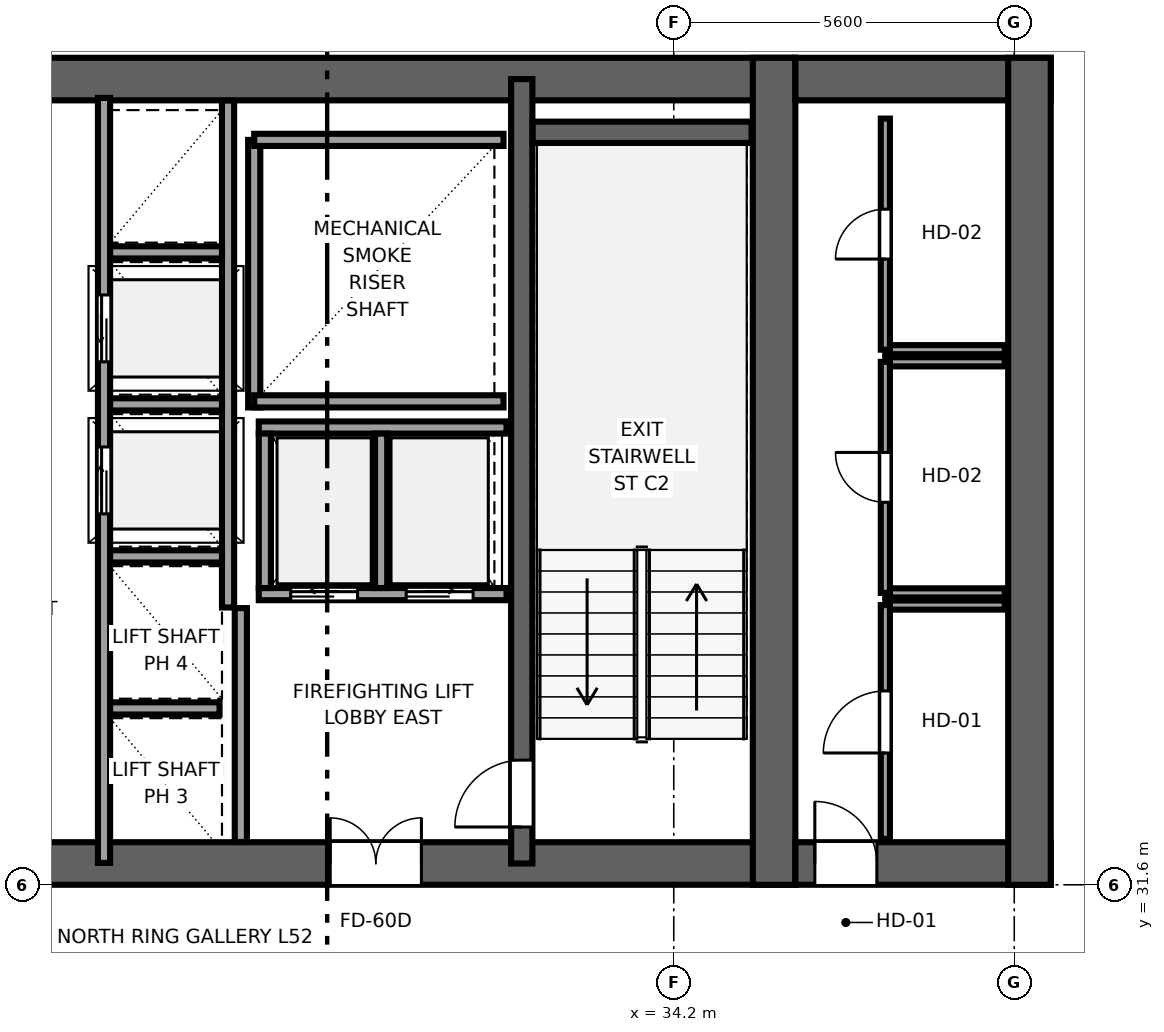
"""IFC4 building model, lengths in metres.
Left out: names, types, materials, properties, quantities, classifications, styles, units other than length and angle.
Written with IfcOpenShell. Run it as: python <this file> out.ifc"""

import sys

from ifc_helpers import new_model, si_unit, direction, frame, frame_2d, origin, place, context, subcontext, project, spatial, rectangle, extrude, source, transform, mapped, element, fill, save


model = new_model("IFC4")
c1 = context("Model", 3, precision=1e-05, world=origin(), true_north=direction((0.0, 1.0)))
c2 = subcontext(c1, "Body", "Model", "MODEL_VIEW")
j1 = project(units=[si_unit("LENGTHUNIT", "METRE"), si_unit("PLANEANGLEUNIT", "RADIAN")], contexts=[c1])
p1 = place(None, origin())
s1 = spatial("IfcSite", under=j1, at=p1, CompositionType="ELEMENT")
p2 = place(p1, origin())
s2 = spatial("IfcBuilding", under=s1, at=p2, CompositionType="ELEMENT")
p3 = place(p2, frame((0.0, 0.0, 198.2)))
s3 = spatial("IfcBuildingStorey", under=s2, at=p3, CompositionType="ELEMENT", Elevation=198.2)
p4 = place(p3, frame((9.8, 31.95, 0.0), z_axis=(0.0, 0.0, 1.0), x_axis=(1.0, 0.0, 0.0)))
e1 = element("IfcWall", 1, at=p4, inside=s3, PredefinedType="SHEAR", context=c2, shape_type="SweptSolid", body=[
    extrude(rectangle(XDim=26.4, YDim=0.7, at=frame_2d((13.2, 0.0))), origin(), (0.0, 0.0, 1.0), 3.55),
])
p5 = place(p4, frame((6.32, 0.0, 0.0), z_axis=(0.0, 0.0, 1.0), x_axis=(-1.0, 0.0, 0.0)))
e2 = element("IfcOpeningElement", 2, at=p5, cuts=e1, PredefinedType="OPENING", context=c2, shape_type="SweptSolid", body=[
    extrude(rectangle(XDim=1.5, YDim=2.04, at=frame_2d((0.75, 1.02))), frame((0.0, 0.36, 0.0), z_axis=(0.0, -1.0, 0.0), x_axis=(1.0, 0.0, 0.0)), (0.0, 0.0, 1.0), 0.72),
])
p6 = place(p4, frame((13.95, 0.0, 0.0), z_axis=(0.0, 0.0, 1.0), x_axis=(-1.0, 0.0, 0.0)))
e3 = element("IfcOpeningElement", 3, at=p6, cuts=e1, PredefinedType="OPENING", context=c2, shape_type="SweptSolid", body=[
    extrude(rectangle(XDim=1.5, YDim=2.04, at=frame_2d((0.75, 1.02))), frame((0.0, 0.36, 0.0), z_axis=(0.0, -1.0, 0.0), x_axis=(1.0, 0.0, 0.0)), (0.0, 0.0, 1.0), 0.72),
])
p7 = place(p4, frame((20.25, 0.0, 0.0), z_axis=(0.0, 0.0, 1.0), x_axis=(-1.0, 0.0, 0.0)))
e4 = element("IfcOpeningElement", 4, at=p7, cuts=e1, PredefinedType="OPENING", context=c2, shape_type="SweptSolid", body=[
    extrude(rectangle(XDim=1.5, YDim=2.04, at=frame_2d((0.75, 1.02))), frame((0.0, 0.36, 0.0), z_axis=(0.0, -1.0, 0.0), x_axis=(1.0, 0.0, 0.0)), (0.0, 0.0, 1.0), 0.72),
])
p8 = place(p4, frame((8.37, 0.0, 0.0), z_axis=(0.0, 0.0, 1.0), x_axis=(-1.0, 0.0, 0.0)))
e5 = element("IfcOpeningElement", 5, at=p8, cuts=e1, PredefinedType="OPENING", context=c2, shape_type="SweptSolid", body=[
    extrude(rectangle(XDim=0.82, YDim=2.01, at=frame_2d((0.41, 1.005))), frame((0.0, 0.36, 0.0), z_axis=(0.0, -1.0, 0.0), x_axis=(1.0, 0.0, 0.0)), (0.0, 0.0, 1.0), 0.72),
])
p9 = place(p3, frame((9.8, 44.85, 0.0), z_axis=(0.0, 0.0, 1.0), x_axis=(1.0, 0.0, 0.0)))
e6 = element("IfcWall", 6, at=p9, inside=s3, PredefinedType="SHEAR", context=c2, shape_type="SweptSolid", body=[
    extrude(rectangle(XDim=26.4, YDim=0.7, at=frame_2d((13.2, 0.0))), origin(), (0.0, 0.0, 1.0), 3.55),
])
p10 = place(p3, frame((35.85, 31.6, 0.0), z_axis=(0.0, 0.0, 1.0), x_axis=(0.0, 1.0, 0.0)))
e7 = element("IfcWall", 7, at=p10, inside=s3, PredefinedType="SHEAR", context=c2, shape_type="SweptSolid", body=[
    extrude(rectangle(XDim=13.6, YDim=0.7, at=frame_2d((6.8, 0.0))), origin(), (0.0, 0.0, 1.0), 3.55),
])
p11 = place(p3, frame((31.7, 31.95, 0.0), z_axis=(0.0, 0.0, 1.0), x_axis=(0.0, 1.0, 0.0)))
e8 = element("IfcWall", 8, at=p11, inside=s3, PredefinedType="SHEAR", context=c2, shape_type="SweptSolid", body=[
    extrude(rectangle(XDim=12.9, YDim=0.35, at=frame_2d((6.45, 0.0))), origin(), (0.0, 0.0, 1.0), 3.55),
])
p12 = place(p11, frame((1.7, 0.0, 0.0), z_axis=(0.0, 0.0, 1.0), x_axis=(-1.0, 0.0, 0.0)))
e9 = element("IfcOpeningElement", 9, at=p12, cuts=e8, PredefinedType="OPENING", context=c2, shape_type="SweptSolid", body=[
    extrude(rectangle(XDim=1.1, YDim=2.12, at=frame_2d((0.55, 1.06))), frame((0.0, 0.185, 0.0), z_axis=(0.0, -1.0, 0.0), x_axis=(1.0, 0.0, 0.0)), (0.0, 0.0, 1.0), 0.37),
])
p13 = place(p3, frame((36.2, 31.95, 0.0), z_axis=(0.0, 0.0, 1.0), x_axis=(1.0, 0.0, 0.0)))
e10 = element("IfcWall", 10, at=p13, inside=s3, PredefinedType="SHEAR", context=c2, shape_type="SweptSolid", body=[
    extrude(rectangle(XDim=4.2, YDim=0.7, at=frame_2d((2.1, 0.0))), origin(), (0.0, 0.0, 1.0), 3.55),
])
p14 = place(p13, frame((1.34, 0.0, 0.0), z_axis=(0.0, 0.0, 1.0), x_axis=(-1.0, 0.0, 0.0)))
e11 = element("IfcOpeningElement", 11, at=p14, cuts=e10, PredefinedType="OPENING", context=c2, shape_type="SweptSolid", body=[
    extrude(rectangle(XDim=1.02, YDim=2.03, at=frame_2d((0.51, 1.015))), frame((0.0, 0.36, 0.0), z_axis=(0.0, -1.0, 0.0), x_axis=(1.0, 0.0, 0.0)), (0.0, 0.0, 1.0), 0.72),
])
p15 = place(p3, frame((36.2, 44.85, 0.0), z_axis=(0.0, 0.0, 1.0), x_axis=(1.0, 0.0, 0.0)))
e12 = element("IfcWall", 12, at=p15, inside=s3, PredefinedType="SHEAR", context=c2, shape_type="SweptSolid", body=[
    extrude(rectangle(XDim=4.2, YDim=0.7, at=frame_2d((2.1, 0.0))), origin(), (0.0, 0.0, 1.0), 3.55),
])
p16 = place(p3, frame((40.05, 31.6, 0.0), z_axis=(0.0, 0.0, 1.0), x_axis=(0.0, 1.0, 0.0)))
e13 = element("IfcWall", 13, at=p16, inside=s3, PredefinedType="SHEAR", context=c2, shape_type="SweptSolid", body=[
    extrude(rectangle(XDim=13.6, YDim=0.7, at=frame_2d((6.8, 0.0))), origin(), (0.0, 0.0, 1.0), 3.55),
])
p17 = place(p3, frame((31.88, 43.975, 0.0), z_axis=(0.0, 0.0, 1.0), x_axis=(1.0, 0.0, 0.0)))
e14 = element("IfcWall", 14, at=p17, inside=s3, PredefinedType="SHEAR", context=c2, shape_type="SweptSolid", body=[
    extrude(rectangle(XDim=3.6, YDim=0.35, at=frame_2d((1.8, 0.0))), origin(), (0.0, 0.0, 1.0), 3.55),
])
p18 = place(p3, frame((27.3, 39.45, 0.0), z_axis=(0.0, 0.0, 1.0), x_axis=(0.0, 1.0, 0.0)))
e15 = element("IfcWall", 15, at=p18, inside=s3, PredefinedType="SOLIDWALL", context=c2, shape_type="SweptSolid", body=[
    extrude(rectangle(XDim=4.4, YDim=0.2, at=frame_2d((2.2, 0.0))), origin(), (0.0, 0.0, 1.0), 3.37),
])
for number, where, z_axis, x_axis in (
    (16, (27.3, 39.55, 0.0), (0.0, 0.0, 1.0), (1.0, 0.0, 0.0)),
    (17, (27.3, 43.85, 0.0), (0.0, 0.0, 1.0), (1.0, 0.0, 0.0)),
):
    element("IfcWall", number, at=place(p3, frame(where, z_axis=z_axis, x_axis=x_axis)), inside=s3, PredefinedType="SOLIDWALL", context=c2, shape_type="SweptSolid", body=[
        extrude(rectangle(XDim=4.1, YDim=0.2, at=frame_2d((2.05, 0.0))), origin(), (0.0, 0.0, 1.0), 3.37),
    ])
p19 = place(p3, frame((27.08, 32.304, 0.0), z_axis=(0.0, 0.0, 1.0), x_axis=(0.0, 1.0, 0.0)))
e18 = element("IfcWall", 18, at=p19, inside=s3, PredefinedType="SOLIDWALL", context=c2, shape_type="SweptSolid", body=[
    extrude(rectangle(XDim=3.846, YDim=0.2, at=frame_2d((1.923, 0.0))), origin(), (0.0, 0.0, 1.0), 3.37),
])
p20 = place(p3, frame((27.375, 36.38, 0.0), z_axis=(0.0, 0.0, 1.0), x_axis=(1.0, 0.0, 0.0)))
e19 = element("IfcWall", 19, at=p20, inside=s3, PredefinedType="SOLIDWALL", context=c2, shape_type="SweptSolid", body=[
    extrude(rectangle(XDim=4.075, YDim=0.2, at=frame_2d((2.038, 0.0))), origin(), (0.0, 0.0, 1.0), 3.37),
])
p21 = place(p20, frame((0.525, 0.0, 0.0)))
e20 = element("IfcOpeningElement", 20, at=p21, cuts=e19, PredefinedType="OPENING", context=c2, shape_type="SweptSolid", body=[
    extrude(rectangle(XDim=1.1, YDim=2.12, at=frame_2d((0.55, 1.06))), frame((0.0, 0.11, 0.0), z_axis=(0.0, -1.0, 0.0), x_axis=(1.0, 0.0, 0.0)), (0.0, 0.0, 1.0), 0.22),
])
p22 = place(p20, frame((2.425, 0.0, 0.0)))
e21 = element("IfcOpeningElement", 21, at=p22, cuts=e19, PredefinedType="OPENING", context=c2, shape_type="SweptSolid", body=[
    extrude(rectangle(XDim=1.1, YDim=2.12, at=frame_2d((0.55, 1.06))), frame((0.0, 0.11, 0.0), z_axis=(0.0, -1.0, 0.0), x_axis=(1.0, 0.0, 0.0)), (0.0, 0.0, 1.0), 0.22),
])
p23 = place(p3, frame((27.375, 39.12, 0.0), z_axis=(0.0, 0.0, 1.0), x_axis=(1.0, 0.0, 0.0)))
e22 = element("IfcWall", 22, at=p23, inside=s3, PredefinedType="SOLIDWALL", context=c2, shape_type="SweptSolid", body=[
    extrude(rectangle(XDim=4.075, YDim=0.2, at=frame_2d((2.038, 0.0))), origin(), (0.0, 0.0, 1.0), 3.37),
])
for number, where, z_axis, x_axis in (
    (23, (27.475, 36.48, 0.0), (0.0, 0.0, 1.0), (0.0, 1.0, 0.0)),
    (24, (29.387, 36.48, 0.0), (0.0, 0.0, 1.0), (0.0, 1.0, 0.0)),
):
    element("IfcWall", number, at=place(p3, frame(where, z_axis=z_axis, x_axis=x_axis)), inside=s3, PredefinedType="SOLIDWALL", context=c2, shape_type="SweptSolid", body=[
        extrude(rectangle(XDim=2.54, YDim=0.2, at=frame_2d((1.27, 0.0))), origin(), (0.0, 0.0, 1.0), 3.37),
    ])
p24 = place(p3, frame((24.83, 31.96, 0.0), z_axis=(0.0, 0.0, 1.0), x_axis=(0.0, 1.0, 0.0)))
e25 = element("IfcWall", 25, at=p24, inside=s3, PredefinedType="SOLIDWALL", context=c2, shape_type="SweptSolid", body=[
    extrude(rectangle(XDim=12.58, YDim=0.2, at=frame_2d((6.29, 0.0))), origin(), (0.0, 0.0, 1.0), 3.37),
])
p25 = place(p24, frame((5.74, 0.0, 0.0)))
e26 = element("IfcOpeningElement", 26, at=p25, cuts=e25, PredefinedType="OPENING", context=c2, shape_type="SweptSolid", body=[
    extrude(rectangle(XDim=1.1, YDim=2.12, at=frame_2d((0.55, 1.06))), frame((0.0, 0.11, 0.0), z_axis=(0.0, -1.0, 0.0), x_axis=(1.0, 0.0, 0.0)), (0.0, 0.0, 1.0), 0.22),
])
p26 = place(p24, frame((8.24, 0.0, 0.0)))
e27 = element("IfcOpeningElement", 27, at=p26, cuts=e25, PredefinedType="OPENING", context=c2, shape_type="SweptSolid", body=[
    extrude(rectangle(XDim=1.1, YDim=2.12, at=frame_2d((0.55, 1.06))), frame((0.0, 0.11, 0.0), z_axis=(0.0, -1.0, 0.0), x_axis=(1.0, 0.0, 0.0)), (0.0, 0.0, 1.0), 0.22),
])
p27 = place(p3, frame((26.87, 36.16, 0.0), z_axis=(0.0, 0.0, 1.0), x_axis=(0.0, 1.0, 0.0)))
e28 = element("IfcWall", 28, at=p27, inside=s3, PredefinedType="SOLIDWALL", context=c2, shape_type="SweptSolid", body=[
    extrude(rectangle(XDim=8.336, YDim=0.2, at=frame_2d((4.168, 0.0))), origin(), (0.0, 0.0, 1.0), 3.37),
])
p28 = place(p3, frame((24.93, 34.5, 0.0), z_axis=(0.0, 0.0, 1.0), x_axis=(1.0, 0.0, 0.0)))
e29 = element("IfcWall", 29, at=p28, inside=s3, PredefinedType="SOLIDWALL", context=c2, shape_type="SweptSolid", body=[
    extrude(rectangle(XDim=1.8, YDim=0.2, at=frame_2d((0.9, 0.0))), origin(), (0.0, 0.0, 1.0), 3.37),
])
for number, where, z_axis, x_axis in (
    (30, (24.93, 37.0, 0.0), (0.0, 0.0, 1.0), (1.0, 0.0, 0.0)),
    (31, (24.93, 39.5, 0.0), (0.0, 0.0, 1.0), (1.0, 0.0, 0.0)),
    (32, (24.93, 42.0, 0.0), (0.0, 0.0, 1.0), (1.0, 0.0, 0.0)),
):
    element("IfcWall", number, at=place(p3, frame(where, z_axis=z_axis, x_axis=x_axis)), inside=s3, PredefinedType="SOLIDWALL", context=c2, shape_type="SweptSolid", body=[
        extrude(rectangle(XDim=1.84, YDim=0.2, at=frame_2d((0.92, 0.0))), origin(), (0.0, 0.0, 1.0), 3.37),
    ])
p29 = place(p3, frame((37.68, 36.2, 0.0), z_axis=(0.0, 0.0, 1.0), x_axis=(1.0, 0.0, 0.0)))
e33 = element("IfcWall", 33, at=p29, inside=s3, PredefinedType="PARTITIONING", context=c2, shape_type="SweptSolid", body=[
    extrude(rectangle(XDim=1.965, YDim=0.15, at=frame_2d((0.982, 0.0))), origin(), (0.0, 0.0, 1.0), 3.37),
])
p30 = place(p3, frame((37.68, 32.355, 0.0), z_axis=(0.0, 0.0, 1.0), x_axis=(0.0, 1.0, 0.0)))
e34 = element("IfcWall", 34, at=p30, inside=s3, PredefinedType="PARTITIONING", context=c2, shape_type="SweptSolid", body=[
    extrude(rectangle(XDim=3.845, YDim=0.15, at=frame_2d((1.922, 0.0))), origin(), (0.0, 0.0, 1.0), 3.37),
])
p31 = place(p30, frame((1.413, 0.0, 0.0)))
e35 = element("IfcOpeningElement", 35, at=p31, cuts=e34, PredefinedType="OPENING", context=c2, shape_type="SweptSolid", body=[
    extrude(rectangle(XDim=1.02, YDim=2.03, at=frame_2d((0.51, 1.015))), frame((0.0, 0.085, 0.0), z_axis=(0.0, -1.0, 0.0), x_axis=(1.0, 0.0, 0.0)), (0.0, 0.0, 1.0), 0.17),
])
for number, where, z_axis, x_axis in (
    (36, (37.68, 36.4, 0.0), (0.0, 0.0, 1.0), (1.0, 0.0, 0.0)),
    (37, (37.68, 40.2, 0.0), (0.0, 0.0, 1.0), (1.0, 0.0, 0.0)),
):
    element("IfcWall", number, at=place(p3, frame(where, z_axis=z_axis, x_axis=x_axis)), inside=s3, PredefinedType="PARTITIONING", context=c2, shape_type="SweptSolid", body=[
        extrude(rectangle(XDim=1.965, YDim=0.15, at=frame_2d((0.982, 0.0))), origin(), (0.0, 0.0, 1.0), 3.37),
    ])
p32 = place(p3, frame((37.68, 36.4, 0.0), z_axis=(0.0, 0.0, 1.0), x_axis=(0.0, 1.0, 0.0)))
e38 = element("IfcWall", 38, at=p32, inside=s3, PredefinedType="PARTITIONING", context=c2, shape_type="SweptSolid", body=[
    extrude(rectangle(XDim=3.8, YDim=0.15, at=frame_2d((1.9, 0.0))), origin(), (0.0, 0.0, 1.0), 3.37),
])
p33 = place(p32, frame((1.49, 0.0, 0.0)))
e39 = element("IfcOpeningElement", 39, at=p33, cuts=e38, PredefinedType="OPENING", context=c2, shape_type="SweptSolid", body=[
    extrude(rectangle(XDim=0.82, YDim=2.01, at=frame_2d((0.41, 1.005))), frame((0.0, 0.085, 0.0), z_axis=(0.0, -1.0, 0.0), x_axis=(1.0, 0.0, 0.0)), (0.0, 0.0, 1.0), 0.17),
])
p34 = place(p3, frame((37.68, 40.4, 0.0), z_axis=(0.0, 0.0, 1.0), x_axis=(1.0, 0.0, 0.0)))
e40 = element("IfcWall", 40, at=p34, inside=s3, PredefinedType="PARTITIONING", context=c2, shape_type="SweptSolid", body=[
    extrude(rectangle(XDim=1.965, YDim=0.15, at=frame_2d((0.982, 0.0))), origin(), (0.0, 0.0, 1.0), 3.37),
])
p35 = place(p3, frame((37.68, 40.4, 0.0), z_axis=(0.0, 0.0, 1.0), x_axis=(0.0, 1.0, 0.0)))
e41 = element("IfcWall", 41, at=p35, inside=s3, PredefinedType="PARTITIONING", context=c2, shape_type="SweptSolid", body=[
    extrude(rectangle(XDim=3.8, YDim=0.15, at=frame_2d((1.9, 0.0))), origin(), (0.0, 0.0, 1.0), 3.37),
])
p36 = place(p35, frame((1.49, 0.0, 0.0)))
e42 = element("IfcOpeningElement", 42, at=p36, cuts=e41, PredefinedType="OPENING", context=c2, shape_type="SweptSolid", body=[
    extrude(rectangle(XDim=0.82, YDim=2.01, at=frame_2d((0.41, 1.005))), frame((0.0, 0.085, 0.0), z_axis=(0.0, -1.0, 0.0), x_axis=(1.0, 0.0, 0.0)), (0.0, 0.0, 1.0), 0.17),
])
m1 = source(origin(), c2, "Body", "SweptSolid", [
    extrude(rectangle(XDim=1.1, YDim=2.12, at=frame_2d((0.55, 1.06))), frame((0.0, 0.025, 0.0), z_axis=(0.0, -1.0, 0.0), x_axis=(1.0, 0.0, 0.0)), (0.0, 0.0, 1.0), 0.05),
])
p37 = place(p12, origin())
e43 = element("IfcDoor", 43, at=p37, inside=s3, OperationType="SINGLE_SWING_LEFT", PredefinedType="DOOR", context=c2, shape_type="MappedRepresentation", body=[
    mapped(m1, transform((0.0, 0.0, 0.0), x_axis=(1.0, 0.0, 0.0), y_axis=(0.0, 1.0, 0.0), z_axis=(0.0, 0.0, 1.0), scale=1.0)),
])
fill(e9, e43)
m2 = source(origin(), c2, "Body", "SweptSolid", [
    extrude(rectangle(XDim=1.5, YDim=2.04, at=frame_2d((0.75, 1.02))), frame((0.0, 0.025, 0.0), z_axis=(0.0, -1.0, 0.0), x_axis=(1.0, 0.0, 0.0)), (0.0, 0.0, 1.0), 0.05),
])
p38 = place(p7, origin())
e44 = element("IfcDoor", 44, at=p38, inside=s3, OperationType="DOUBLE_DOOR_SINGLE_SWING", PredefinedType="DOOR", context=c2, shape_type="MappedRepresentation", body=[
    mapped(m2, transform((0.0, 0.0, 0.0), x_axis=(1.0, 0.0, 0.0), y_axis=(0.0, 1.0, 0.0), z_axis=(0.0, 0.0, 1.0), scale=1.0)),
])
fill(e4, e44)
m3 = source(origin(), c2, "Body", "SweptSolid", [
    extrude(rectangle(XDim=1.02, YDim=2.03, at=frame_2d((0.51, 1.015))), frame((0.0, 0.025, 0.0), z_axis=(0.0, -1.0, 0.0), x_axis=(1.0, 0.0, 0.0)), (0.0, 0.0, 1.0), 0.05),
])
p39 = place(p14, origin())
e45 = element("IfcDoor", 45, at=p39, inside=s3, OperationType="SINGLE_SWING_LEFT", PredefinedType="DOOR", context=c2, shape_type="MappedRepresentation", body=[
    mapped(m3, transform((0.0, 0.0, 0.0), x_axis=(1.0, 0.0, 0.0), y_axis=(0.0, 1.0, 0.0), z_axis=(0.0, 0.0, 1.0), scale=1.0)),
])
fill(e11, e45)
m4 = source(origin(), c2, "Body", "SweptSolid", [
    extrude(rectangle(XDim=1.1, YDim=2.12, at=frame_2d((0.55, 1.06))), frame((0.0, 0.025, 0.0), z_axis=(0.0, -1.0, 0.0), x_axis=(1.0, 0.0, 0.0)), (0.0, 0.0, 1.0), 0.05),
])
p40 = place(p21, origin())
e46 = element("IfcDoor", 46, at=p40, inside=s3, OperationType="SLIDING_TO_LEFT", PredefinedType="DOOR", context=c2, shape_type="MappedRepresentation", body=[
    mapped(m4, transform((0.0, 0.0, 0.0), x_axis=(1.0, 0.0, 0.0), y_axis=(0.0, 1.0, 0.0), z_axis=(0.0, 0.0, 1.0), scale=1.0)),
])
fill(e20, e46)
p41 = place(p22, origin())
e47 = element("IfcDoor", 47, at=p41, inside=s3, OperationType="SLIDING_TO_RIGHT", PredefinedType="DOOR", context=c2, shape_type="MappedRepresentation", body=[
    mapped(m4, transform((0.0, 0.0, 0.0), x_axis=(1.0, 0.0, 0.0), y_axis=(0.0, 1.0, 0.0), z_axis=(0.0, 0.0, 1.0), scale=1.0)),
])
fill(e21, e47)
p42 = place(p25, origin())
e48 = element("IfcDoor", 48, at=p42, inside=s3, OperationType="SLIDING_TO_RIGHT", PredefinedType="DOOR", context=c2, shape_type="MappedRepresentation", body=[
    mapped(m4, transform((0.0, 0.0, 0.0), x_axis=(1.0, 0.0, 0.0), y_axis=(0.0, 1.0, 0.0), z_axis=(0.0, 0.0, 1.0), scale=1.0)),
])
fill(e26, e48)
p43 = place(p26, origin())
e49 = element("IfcDoor", 49, at=p43, inside=s3, OperationType="SLIDING_TO_LEFT", PredefinedType="DOOR", context=c2, shape_type="MappedRepresentation", body=[
    mapped(m4, transform((0.0, 0.0, 0.0), x_axis=(1.0, 0.0, 0.0), y_axis=(0.0, 1.0, 0.0), z_axis=(0.0, 0.0, 1.0), scale=1.0)),
])
fill(e27, e49)
p44 = place(p31, origin())
e50 = element("IfcDoor", 50, at=p44, inside=s3, OperationType="SINGLE_SWING_LEFT", PredefinedType="DOOR", context=c2, shape_type="MappedRepresentation", body=[
    mapped(m3, transform((0.0, 0.0, 0.0), x_axis=(1.0, 0.0, 0.0), y_axis=(0.0, 1.0, 0.0), z_axis=(0.0, 0.0, 1.0), scale=1.0)),
])
fill(e35, e50)
m5 = source(origin(), c2, "Body", "SweptSolid", [
    extrude(rectangle(XDim=0.82, YDim=2.01, at=frame_2d((0.41, 1.005))), frame((0.0, 0.025, 0.0), z_axis=(0.0, -1.0, 0.0), x_axis=(1.0, 0.0, 0.0)), (0.0, 0.0, 1.0), 0.05),
])
p45 = place(p33, origin())
e51 = element("IfcDoor", 51, at=p45, inside=s3, OperationType="SINGLE_SWING_RIGHT", PredefinedType="DOOR", context=c2, shape_type="MappedRepresentation", body=[
    mapped(m5, transform((0.0, 0.0, 0.0), x_axis=(1.0, 0.0, 0.0), y_axis=(0.0, 1.0, 0.0), z_axis=(0.0, 0.0, 1.0), scale=1.0)),
])
fill(e39, e51)
p46 = place(p36, origin())
e52 = element("IfcDoor", 52, at=p46, inside=s3, OperationType="SINGLE_SWING_LEFT", PredefinedType="DOOR", context=c2, shape_type="MappedRepresentation", body=[
    mapped(m5, transform((0.0, 0.0, 0.0), x_axis=(1.0, 0.0, 0.0), y_axis=(0.0, 1.0, 0.0), z_axis=(0.0, 0.0, 1.0), scale=1.0)),
])
fill(e42, e52)
save(model, sys.argv[1])
